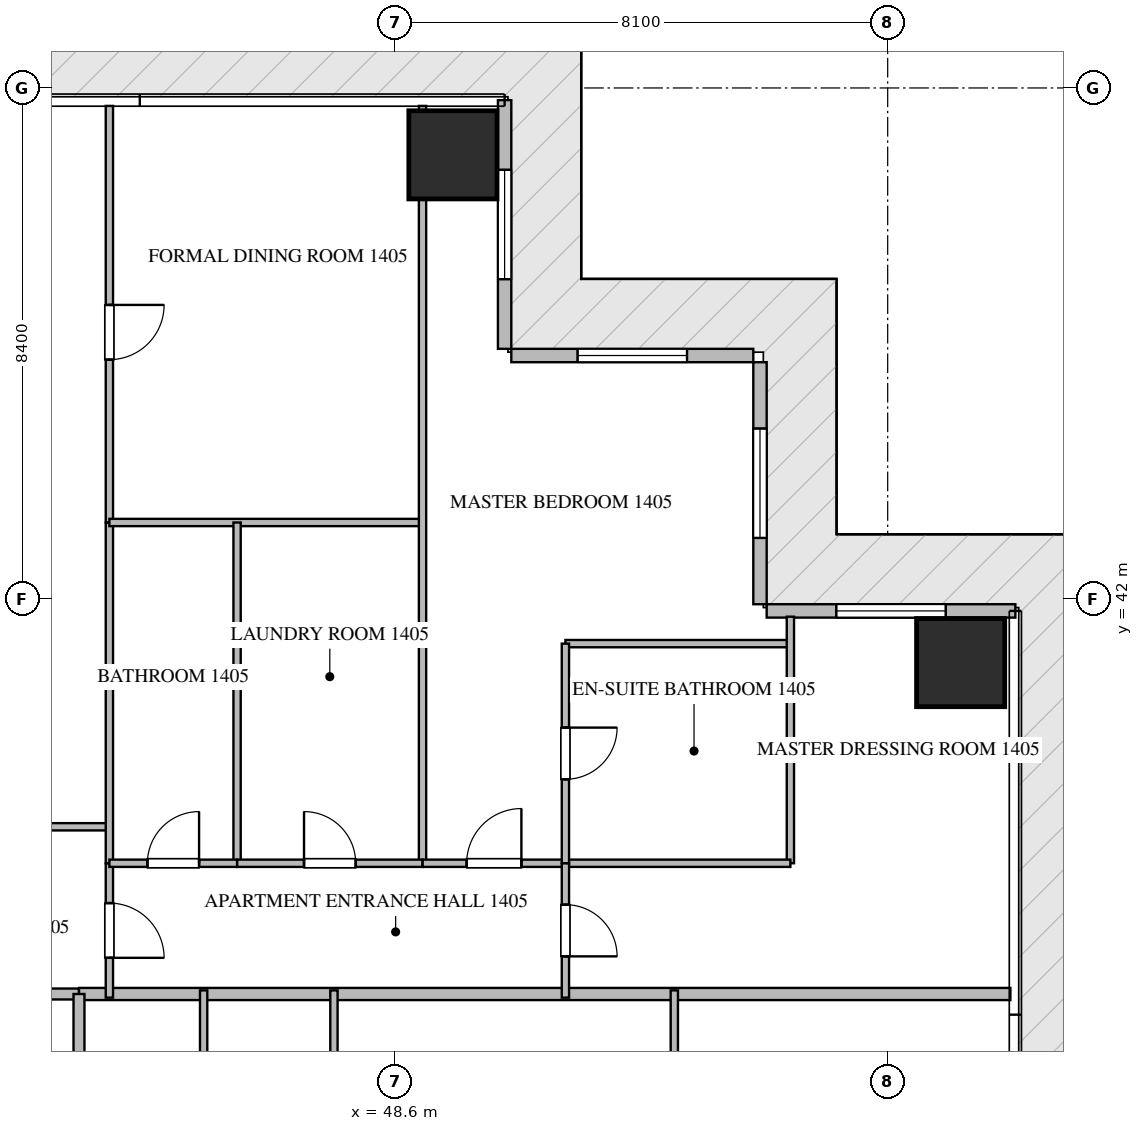
"""IFC4 building model, lengths in metres.
Left out: names, types, materials, properties, quantities, classifications, styles, units other than length and angle.
Written with IfcOpenShell. Run it as: python <this file> out.ifc"""

import sys

from ifc_helpers import new_model, si_unit, direction, frame, frame_2d, origin, origin_2d, place, context, subcontext, project, spatial, rectangle, extrude, source, transform, mapped, element, fill, save


model = new_model("IFC4")
c1 = context("Model", 3, precision=1e-05, world=origin(), true_north=direction((0.0, 1.0)))
c2 = subcontext(c1, "Body", "Model", "MODEL_VIEW")
j1 = project(units=[si_unit("LENGTHUNIT", "METRE"), si_unit("PLANEANGLEUNIT", "RADIAN")], contexts=[c1])
p1 = place(None, origin())
s1 = spatial("IfcSite", under=j1, at=p1, CompositionType="ELEMENT")
p2 = place(p1, origin())
s2 = spatial("IfcBuilding", under=s1, at=p2, CompositionType="ELEMENT")
p3 = place(p2, frame((0.0, 0.0, 60.45)))
s3 = spatial("IfcBuildingStorey", under=s2, at=p3, CompositionType="ELEMENT", Elevation=60.45)
m1 = source(origin(), c2, "Body", "SweptSolid", [
    extrude(rectangle(XDim=1.45, YDim=1.45, at=origin_2d()), origin(), (0.0, 0.0, 1.0), 3.75),
])
for number, where, z_axis, x_axis in (
    (1, (49.55, 49.3, -0.26), (0.0, 0.0, 1.0), (1.0, 0.0, 0.0)),
    (2, (57.9, 40.95, -0.26), (0.0, 0.0, 1.0), (1.0, 0.0, 0.0)),
):
    element("IfcColumn", number, at=place(p3, frame(where, z_axis=z_axis, x_axis=x_axis)), inside=s3, PredefinedType="COLUMN", context=c2, shape_type="MappedRepresentation", body=[
        mapped(m1, transform((0.0, 0.0, 0.0), scale=1.0)),
    ])
p4 = place(p3, frame((58.8, 41.8, 0.0), z_axis=(0.0, 0.0, 1.0), x_axis=(-1.0, 0.0, 0.0)))
e3 = element("IfcWall", 3, at=p4, inside=s3, PredefinedType="ELEMENTEDWALL", context=c2, shape_type="SweptSolid", body=[
    extrude(rectangle(XDim=4.09, YDim=0.22, at=frame_2d((2.045, 0.0))), origin(), (0.0, 0.0, 1.0), 3.475),
])
p5 = place(p4, frame((1.145, 0.0, 0.65)))
e4 = element("IfcOpeningElement", 4, at=p5, cuts=e3, PredefinedType="OPENING", context=c2, shape_type="SweptSolid", body=[
    extrude(rectangle(XDim=1.8, YDim=2.1, at=frame_2d((0.9, 1.05))), frame((0.0, 0.12, 0.0), z_axis=(0.0, -1.0, 0.0), x_axis=(1.0, 0.0, 0.0)), (0.0, 0.0, 1.0), 0.24),
])
p6 = place(p3, frame((54.6, 41.91, 0.0), z_axis=(0.0, 0.0, 1.0), x_axis=(0.0, 1.0, 0.0)))
e5 = element("IfcWall", 5, at=p6, inside=s3, PredefinedType="ELEMENTEDWALL", context=c2, shape_type="SweptSolid", body=[
    extrude(rectangle(XDim=3.98, YDim=0.22, at=frame_2d((1.99, 0.0))), origin(), (0.0, 0.0, 1.0), 3.475),
])
p7 = place(p6, frame((1.09, 0.0, 0.65)))
e6 = element("IfcOpeningElement", 6, at=p7, cuts=e5, PredefinedType="OPENING", context=c2, shape_type="SweptSolid", body=[
    extrude(rectangle(XDim=1.8, YDim=2.1, at=frame_2d((0.9, 1.05))), frame((0.0, 0.12, 0.0), z_axis=(0.0, -1.0, 0.0), x_axis=(1.0, 0.0, 0.0)), (0.0, 0.0, 1.0), 0.24),
])
p8 = place(p3, frame((54.49, 46.0, 0.0), z_axis=(0.0, 0.0, 1.0), x_axis=(-1.0, 0.0, 0.0)))
e7 = element("IfcWall", 7, at=p8, inside=s3, PredefinedType="ELEMENTEDWALL", context=c2, shape_type="SweptSolid", body=[
    extrude(rectangle(XDim=3.98, YDim=0.22, at=frame_2d((1.99, 0.0))), origin(), (0.0, 0.0, 1.0), 3.475),
])
p9 = place(p8, frame((1.09, 0.0, 0.65)))
e8 = element("IfcOpeningElement", 8, at=p9, cuts=e7, PredefinedType="OPENING", context=c2, shape_type="SweptSolid", body=[
    extrude(rectangle(XDim=1.8, YDim=2.1, at=frame_2d((0.9, 1.05))), frame((0.0, 0.12, 0.0), z_axis=(0.0, -1.0, 0.0), x_axis=(1.0, 0.0, 0.0)), (0.0, 0.0, 1.0), 0.24),
])
p10 = place(p3, frame((50.4, 46.11, 0.0), z_axis=(0.0, 0.0, 1.0), x_axis=(0.0, 1.0, 0.0)))
e9 = element("IfcWall", 9, at=p10, inside=s3, PredefinedType="ELEMENTEDWALL", context=c2, shape_type="SweptSolid", body=[
    extrude(rectangle(XDim=4.09, YDim=0.22, at=frame_2d((2.045, 0.0))), origin(), (0.0, 0.0, 1.0), 3.475),
])
p11 = place(p10, frame((1.145, 0.0, 0.65)))
e10 = element("IfcOpeningElement", 10, at=p11, cuts=e9, PredefinedType="OPENING", context=c2, shape_type="SweptSolid", body=[
    extrude(rectangle(XDim=1.8, YDim=2.1, at=frame_2d((0.9, 1.05))), frame((0.0, 0.12, 0.0), z_axis=(0.0, -1.0, 0.0), x_axis=(1.0, 0.0, 0.0)), (0.0, 0.0, 1.0), 0.24),
])
p12 = place(p3, frame((43.4, 35.5, 0.0), z_axis=(0.0, 0.0, 1.0), x_axis=(1.0, 0.0, 0.0)))
e11 = element("IfcWall", 11, at=p12, inside=s3, PredefinedType="PARTITIONING", context=c2, shape_type="SweptSolid", body=[
    extrude(rectangle(XDim=15.318, YDim=0.2, at=frame_2d((7.659, 0.0))), origin(), (0.0, 0.0, 1.0), 3.49),
])
p13 = place(p3, frame((21.402, 35.5, 0.0), z_axis=(0.0, 0.0, 1.0), x_axis=(1.0, 0.0, 0.0)))
e12 = element("IfcWall", 12, at=p13, inside=s3, PredefinedType="PARTITIONING", context=c2, shape_type="SweptSolid", body=[
    extrude(rectangle(XDim=21.996, YDim=0.18, at=frame_2d((10.998, 0.0))), origin(), (0.0, 0.0, 1.0), 3.49),
])
p14 = place(p13, frame((2.1, 0.0, 0.0)))
e13 = element("IfcOpeningElement", 13, at=p14, cuts=e12, PredefinedType="OPENING", context=c2, shape_type="SweptSolid", body=[
    extrude(rectangle(XDim=1.0, YDim=2.15, at=frame_2d((0.5, 1.075))), frame((0.0, 0.1, 0.0), z_axis=(0.0, -1.0, 0.0), x_axis=(1.0, 0.0, 0.0)), (0.0, 0.0, 1.0), 0.2),
])
p15 = place(p13, frame((5.942, 0.0, 0.0)))
e14 = element("IfcOpeningElement", 14, at=p15, cuts=e12, PredefinedType="OPENING", context=c2, shape_type="SweptSolid", body=[
    extrude(rectangle(XDim=1.0, YDim=2.15, at=frame_2d((0.5, 1.075))), frame((0.0, 0.1, 0.0), z_axis=(0.0, -1.0, 0.0), x_axis=(1.0, 0.0, 0.0)), (0.0, 0.0, 1.0), 0.2),
])
p16 = place(p13, frame((16.272, 0.0, 0.0)))
e15 = element("IfcOpeningElement", 15, at=p16, cuts=e12, PredefinedType="OPENING", context=c2, shape_type="SweptSolid", body=[
    extrude(rectangle(XDim=1.0, YDim=2.15, at=frame_2d((0.5, 1.075))), frame((0.0, 0.1, 0.0), z_axis=(0.0, -1.0, 0.0), x_axis=(1.0, 0.0, 0.0)), (0.0, 0.0, 1.0), 0.2),
])
p17 = place(p3, frame((43.4, 14.9, 0.0), z_axis=(0.0, 0.0, 1.0), x_axis=(0.0, 1.0, 0.0)))
e16 = element("IfcWall", 16, at=p17, inside=s3, PredefinedType="PARTITIONING", context=c2, shape_type="SweptSolid", body=[
    extrude(rectangle(XDim=20.6, YDim=0.18, at=frame_2d((10.3, 0.0))), origin(), (0.0, 0.0, 1.0), 3.49),
])
p18 = place(p17, frame((5.429, 0.0, 0.0)))
e17 = element("IfcOpeningElement", 17, at=p18, cuts=e16, PredefinedType="OPENING", context=c2, shape_type="SweptSolid", body=[
    extrude(rectangle(XDim=1.0, YDim=2.15, at=frame_2d((0.5, 1.075))), frame((0.0, 0.1, 0.0), z_axis=(0.0, -1.0, 0.0), x_axis=(1.0, 0.0, 0.0)), (0.0, 0.0, 1.0), 0.2),
])
p19 = place(p17, frame((10.506, 0.0, 0.0)))
e18 = element("IfcOpeningElement", 18, at=p19, cuts=e16, PredefinedType="OPENING", context=c2, shape_type="SweptSolid", body=[
    extrude(rectangle(XDim=1.0, YDim=2.15, at=frame_2d((0.5, 1.075))), frame((0.0, 0.1, 0.0), z_axis=(0.0, -1.0, 0.0), x_axis=(1.0, 0.0, 0.0)), (0.0, 0.0, 1.0), 0.2),
])
p20 = place(p3, frame((41.05, 38.25, 0.0), z_axis=(0.0, 0.0, 1.0), x_axis=(1.0, 0.0, 0.0)))
e19 = element("IfcWall", 19, at=p20, inside=s3, PredefinedType="PARTITIONING", context=c2, shape_type="SweptSolid", body=[
    extrude(rectangle(XDim=2.85, YDim=0.12, at=frame_2d((1.425, 0.0))), origin(), (0.0, 0.0, 1.0), 3.49),
])
p21 = place(p20, frame((1.0, 0.0, 0.0)))
e20 = element("IfcOpeningElement", 20, at=p21, cuts=e19, PredefinedType="OPENING", context=c2, shape_type="SweptSolid", body=[
    extrude(rectangle(XDim=0.85, YDim=2.1, at=frame_2d((0.425, 1.05))), frame((0.0, 0.07, 0.0), z_axis=(0.0, -1.0, 0.0), x_axis=(1.0, 0.0, 0.0)), (0.0, 0.0, 1.0), 0.14),
])
p22 = place(p3, frame((43.9, 37.65, 0.0), z_axis=(0.0, 0.0, 1.0), x_axis=(0.0, -1.0, 0.0)))
e21 = element("IfcWall", 21, at=p22, inside=s3, PredefinedType="PARTITIONING", context=c2, shape_type="SweptSolid", body=[
    extrude(rectangle(XDim=2.21, YDim=0.12, at=frame_2d((1.105, 0.0))), origin(), (0.0, 0.0, 1.0), 3.49),
])
p23 = place(p22, frame((0.655, 0.0, 0.0)))
e22 = element("IfcOpeningElement", 22, at=p23, cuts=e21, PredefinedType="OPENING", context=c2, shape_type="SweptSolid", body=[
    extrude(rectangle(XDim=0.9, YDim=2.1, at=frame_2d((0.45, 1.05))), frame((0.0, 0.07, 0.0), z_axis=(0.0, -1.0, 0.0), x_axis=(1.0, 0.0, 0.0)), (0.0, 0.0, 1.0), 0.14),
])
p24 = place(p3, frame((43.9, 50.105, 0.0), z_axis=(0.0, 0.0, 1.0), x_axis=(0.0, -1.0, 0.0)))
e23 = element("IfcWall", 23, at=p24, inside=s3, PredefinedType="PARTITIONING", context=c2, shape_type="SweptSolid", body=[
    extrude(rectangle(XDim=6.851, YDim=0.12, at=frame_2d((3.426, 0.0))), origin(), (0.0, 0.0, 1.0), 3.49),
])
p25 = place(p24, frame((3.273, 0.0, 0.0)))
e24 = element("IfcOpeningElement", 24, at=p25, cuts=e23, PredefinedType="OPENING", context=c2, shape_type="SweptSolid", body=[
    extrude(rectangle(XDim=0.9, YDim=2.1, at=frame_2d((0.45, 1.05))), frame((0.0, 0.07, 0.0), z_axis=(0.0, -1.0, 0.0), x_axis=(1.0, 0.0, 0.0)), (0.0, 0.0, 1.0), 0.14),
])
p26 = place(p3, frame((43.9, 43.252, 0.0), z_axis=(0.0, 0.0, 1.0), x_axis=(0.0, -1.0, 0.0)))
e25 = element("IfcWall", 25, at=p26, inside=s3, PredefinedType="PARTITIONING", context=c2, shape_type="SweptSolid", body=[
    extrude(rectangle(XDim=5.6, YDim=0.12, at=frame_2d((2.8, 0.0))), origin(), (0.0, 0.0, 1.0), 3.49),
])
p27 = place(p3, frame((43.9, 43.254, 0.0), z_axis=(0.0, 0.0, 1.0), x_axis=(1.0, 0.0, 0.0)))
e26 = element("IfcWall", 26, at=p27, inside=s3, PredefinedType="PARTITIONING", context=c2, shape_type="SweptSolid", body=[
    extrude(rectangle(XDim=5.15, YDim=0.12, at=frame_2d((2.575, 0.0))), origin(), (0.0, 0.0, 1.0), 3.49),
])
p28 = place(p3, frame((49.05, 50.105, 0.0), z_axis=(0.0, 0.0, 1.0), x_axis=(0.0, -1.0, 0.0)))
e27 = element("IfcWall", 27, at=p28, inside=s3, PredefinedType="PARTITIONING", context=c2, shape_type="SweptSolid", body=[
    extrude(rectangle(XDim=12.455, YDim=0.12, at=frame_2d((6.228, 0.0))), origin(), (0.0, 0.0, 1.0), 3.49),
])
p29 = place(p3, frame((46.0, 43.254, 0.0), z_axis=(0.0, 0.0, 1.0), x_axis=(0.0, -1.0, 0.0)))
e28 = element("IfcWall", 28, at=p29, inside=s3, PredefinedType="PARTITIONING", context=c2, shape_type="SweptSolid", body=[
    extrude(rectangle(XDim=5.604, YDim=0.12, at=frame_2d((2.802, 0.0))), origin(), (0.0, 0.0, 1.0), 3.49),
])
p30 = place(p3, frame((43.9, 37.65, 0.0), z_axis=(0.0, 0.0, 1.0), x_axis=(1.0, 0.0, 0.0)))
e29 = element("IfcWall", 29, at=p30, inside=s3, PredefinedType="PARTITIONING", context=c2, shape_type="SweptSolid", body=[
    extrude(rectangle(XDim=2.1, YDim=0.12, at=frame_2d((1.05, 0.0))), origin(), (0.0, 0.0, 1.0), 3.49),
])
p31 = place(p30, frame((0.625, 0.0, 0.0)))
e30 = element("IfcOpeningElement", 30, at=p31, cuts=e29, PredefinedType="OPENING", context=c2, shape_type="SweptSolid", body=[
    extrude(rectangle(XDim=0.85, YDim=2.1, at=frame_2d((0.425, 1.05))), frame((0.0, 0.07, 0.0), z_axis=(0.0, -1.0, 0.0), x_axis=(1.0, 0.0, 0.0)), (0.0, 0.0, 1.0), 0.14),
])
p32 = place(p3, frame((46.002, 37.65, 0.0), z_axis=(0.0, 0.0, 1.0), x_axis=(1.0, 0.0, 0.0)))
e31 = element("IfcWall", 31, at=p32, inside=s3, PredefinedType="PARTITIONING", context=c2, shape_type="SweptSolid", body=[
    extrude(rectangle(XDim=3.048, YDim=0.12, at=frame_2d((1.524, 0.0))), origin(), (0.0, 0.0, 1.0), 3.49),
])
p33 = place(p32, frame((1.099, 0.0, 0.0)))
e32 = element("IfcOpeningElement", 32, at=p33, cuts=e31, PredefinedType="OPENING", context=c2, shape_type="SweptSolid", body=[
    extrude(rectangle(XDim=0.85, YDim=2.1, at=frame_2d((0.425, 1.05))), frame((0.0, 0.07, 0.0), z_axis=(0.0, -1.0, 0.0), x_axis=(1.0, 0.0, 0.0)), (0.0, 0.0, 1.0), 0.14),
])
p34 = place(p3, frame((49.052, 37.65, 0.0), z_axis=(0.0, 0.0, 1.0), x_axis=(1.0, 0.0, 0.0)))
e33 = element("IfcWall", 33, at=p34, inside=s3, PredefinedType="PARTITIONING", context=c2, shape_type="SweptSolid", body=[
    extrude(rectangle(XDim=2.348, YDim=0.12, at=frame_2d((1.174, 0.0))), origin(), (0.0, 0.0, 1.0), 3.49),
])
p35 = place(p34, frame((0.724, 0.0, 0.0)))
e34 = element("IfcOpeningElement", 34, at=p35, cuts=e33, PredefinedType="OPENING", context=c2, shape_type="SweptSolid", body=[
    extrude(rectangle(XDim=0.9, YDim=2.1, at=frame_2d((0.45, 1.05))), frame((0.0, 0.07, 0.0), z_axis=(0.0, -1.0, 0.0), x_axis=(1.0, 0.0, 0.0)), (0.0, 0.0, 1.0), 0.14),
])
p36 = place(p3, frame((51.4, 41.262, 0.0), z_axis=(0.0, 0.0, 1.0), x_axis=(1.0, 0.0, 0.0)))
e35 = element("IfcWall", 35, at=p36, inside=s3, PredefinedType="PARTITIONING", context=c2, shape_type="SweptSolid", body=[
    extrude(rectangle(XDim=3.7, YDim=0.12, at=frame_2d((1.85, 0.0))), origin(), (0.0, 0.0, 1.0), 3.49),
])
p37 = place(p3, frame((55.1, 41.705, 0.0), z_axis=(0.0, 0.0, 1.0), x_axis=(0.0, -1.0, 0.0)))
e36 = element("IfcWall", 36, at=p37, inside=s3, PredefinedType="PARTITIONING", context=c2, shape_type="SweptSolid", body=[
    extrude(rectangle(XDim=4.055, YDim=0.12, at=frame_2d((2.028, 0.0))), origin(), (0.0, 0.0, 1.0), 3.49),
])
p38 = place(p3, frame((51.402, 37.65, 0.0), z_axis=(0.0, 0.0, 1.0), x_axis=(1.0, 0.0, 0.0)))
e37 = element("IfcWall", 37, at=p38, inside=s3, PredefinedType="PARTITIONING", context=c2, shape_type="SweptSolid", body=[
    extrude(rectangle(XDim=3.698, YDim=0.12, at=frame_2d((1.849, 0.0))), origin(), (0.0, 0.0, 1.0), 3.49),
])
p39 = place(p3, frame((51.4, 41.262, 0.0), z_axis=(0.0, 0.0, 1.0), x_axis=(0.0, -1.0, 0.0)))
e38 = element("IfcWall", 38, at=p39, inside=s3, PredefinedType="PARTITIONING", context=c2, shape_type="SweptSolid", body=[
    extrude(rectangle(XDim=3.612, YDim=0.12, at=frame_2d((1.806, 0.0))), origin(), (0.0, 0.0, 1.0), 3.49),
])
p40 = place(p39, frame((1.381, 0.0, 0.0)))
e39 = element("IfcOpeningElement", 39, at=p40, cuts=e38, PredefinedType="OPENING", context=c2, shape_type="SweptSolid", body=[
    extrude(rectangle(XDim=0.85, YDim=2.1, at=frame_2d((0.425, 1.05))), frame((0.0, 0.07, 0.0), z_axis=(0.0, -1.0, 0.0), x_axis=(1.0, 0.0, 0.0)), (0.0, 0.0, 1.0), 0.14),
])
p41 = place(p3, frame((51.4, 37.648, 0.0), z_axis=(0.0, 0.0, 1.0), x_axis=(0.0, -1.0, 0.0)))
e40 = element("IfcWall", 40, at=p41, inside=s3, PredefinedType="PARTITIONING", context=c2, shape_type="SweptSolid", body=[
    extrude(rectangle(XDim=2.208, YDim=0.12, at=frame_2d((1.104, 0.0))), origin(), (0.0, 0.0, 1.0), 3.49),
])
p42 = place(p41, frame((0.679, 0.0, 0.0)))
e41 = element("IfcOpeningElement", 41, at=p42, cuts=e40, PredefinedType="OPENING", context=c2, shape_type="SweptSolid", body=[
    extrude(rectangle(XDim=0.85, YDim=2.1, at=frame_2d((0.425, 1.05))), frame((0.0, 0.07, 0.0), z_axis=(0.0, -1.0, 0.0), x_axis=(1.0, 0.0, 0.0)), (0.0, 0.0, 1.0), 0.14),
])
for number, where, z_axis, x_axis in (
    (42, (53.191, 27.8, 0.0), (0.0, 0.0, 1.0), (0.0, 1.0, 0.0)),
    (43, (47.593, 27.8, 0.0), (0.0, 0.0, 1.0), (0.0, 1.0, 0.0)),
    (44, (45.45, 27.8, 0.0), (0.0, 0.0, 1.0), (0.0, 1.0, 0.0)),
):
    element("IfcWall", number, at=place(p3, frame(where, z_axis=z_axis, x_axis=x_axis)), inside=s3, PredefinedType="PARTITIONING", context=c2, shape_type="SweptSolid", body=[
        extrude(rectangle(XDim=7.76, YDim=0.12, at=frame_2d((3.88, 0.0))), origin(), (0.0, 0.0, 1.0), 3.49),
    ])
m2 = source(origin(), c2, "Body", "SweptSolid", [
    extrude(rectangle(XDim=1.8, YDim=2.1, at=frame_2d((0.9, 1.05))), frame((0.0, 0.03, 0.0), z_axis=(0.0, -1.0, 0.0), x_axis=(1.0, 0.0, 0.0)), (0.0, 0.0, 1.0), 0.06),
])
p43 = place(p5, origin())
e45 = element("IfcWindow", 45, at=p43, inside=s3, PartitioningType="SINGLE_PANEL", PredefinedType="WINDOW", context=c2, shape_type="MappedRepresentation", body=[
    mapped(m2, transform((0.0, 0.0, 0.0), scale=1.0)),
])
fill(e4, e45)
p44 = place(p7, origin())
e46 = element("IfcWindow", 46, at=p44, inside=s3, PartitioningType="SINGLE_PANEL", PredefinedType="WINDOW", context=c2, shape_type="MappedRepresentation", body=[
    mapped(m2, transform((0.0, 0.0, 0.0), scale=1.0)),
])
fill(e6, e46)
p45 = place(p9, origin())
e47 = element("IfcWindow", 47, at=p45, inside=s3, PartitioningType="SINGLE_PANEL", PredefinedType="WINDOW", context=c2, shape_type="MappedRepresentation", body=[
    mapped(m2, transform((0.0, 0.0, 0.0), scale=1.0)),
])
fill(e8, e47)
p46 = place(p11, origin())
e48 = element("IfcWindow", 48, at=p46, inside=s3, PartitioningType="SINGLE_PANEL", PredefinedType="WINDOW", context=c2, shape_type="MappedRepresentation", body=[
    mapped(m2, transform((0.0, 0.0, 0.0), scale=1.0)),
])
fill(e10, e48)
m3 = source(origin(), c2, "Body", "SweptSolid", [
    extrude(rectangle(XDim=0.9, YDim=2.1, at=frame_2d((0.45, 1.05))), frame((0.0, 0.025, 0.0), z_axis=(0.0, -1.0, 0.0), x_axis=(1.0, 0.0, 0.0)), (0.0, 0.0, 1.0), 0.05),
])
p47 = place(p23, origin())
e49 = element("IfcDoor", 49, at=p47, inside=s3, OperationType="SINGLE_SWING_RIGHT", PredefinedType="DOOR", context=c2, shape_type="MappedRepresentation", body=[
    mapped(m3, transform((0.0, 0.0, 0.0), scale=1.0)),
])
fill(e22, e49)
p48 = place(p25, origin())
e50 = element("IfcDoor", 50, at=p48, inside=s3, OperationType="SINGLE_SWING_LEFT", PredefinedType="DOOR", context=c2, shape_type="MappedRepresentation", body=[
    mapped(m3, transform((0.0, 0.0, 0.0), scale=1.0)),
])
fill(e24, e50)
m4 = source(origin(), c2, "Body", "SweptSolid", [
    extrude(rectangle(XDim=0.85, YDim=2.1, at=frame_2d((0.425, 1.05))), frame((0.0, 0.025, 0.0), z_axis=(0.0, -1.0, 0.0), x_axis=(1.0, 0.0, 0.0)), (0.0, 0.0, 1.0), 0.05),
])
p49 = place(p31, origin())
e51 = element("IfcDoor", 51, at=p49, inside=s3, OperationType="SINGLE_SWING_RIGHT", PredefinedType="DOOR", context=c2, shape_type="MappedRepresentation", body=[
    mapped(m4, transform((0.0, 0.0, 0.0), scale=1.0)),
])
fill(e30, e51)
p50 = place(p33, origin())
e52 = element("IfcDoor", 52, at=p50, inside=s3, OperationType="SINGLE_SWING_LEFT", PredefinedType="DOOR", context=c2, shape_type="MappedRepresentation", body=[
    mapped(m4, transform((0.0, 0.0, 0.0), scale=1.0)),
])
fill(e32, e52)
p51 = place(p35, origin())
e53 = element("IfcDoor", 53, at=p51, inside=s3, OperationType="SINGLE_SWING_RIGHT", PredefinedType="DOOR", context=c2, shape_type="MappedRepresentation", body=[
    mapped(m3, transform((0.0, 0.0, 0.0), scale=1.0)),
])
fill(e34, e53)
p52 = place(p40, origin())
e54 = element("IfcDoor", 54, at=p52, inside=s3, OperationType="SINGLE_SWING_LEFT", PredefinedType="DOOR", context=c2, shape_type="MappedRepresentation", body=[
    mapped(m4, transform((0.0, 0.0, 0.0), scale=1.0)),
])
fill(e39, e54)
p53 = place(p42, origin())
e55 = element("IfcDoor", 55, at=p53, inside=s3, OperationType="SINGLE_SWING_RIGHT", PredefinedType="DOOR", context=c2, shape_type="MappedRepresentation", body=[
    mapped(m4, transform((0.0, 0.0, 0.0), scale=1.0)),
])
fill(e41, e55)
save(model, sys.argv[1])
